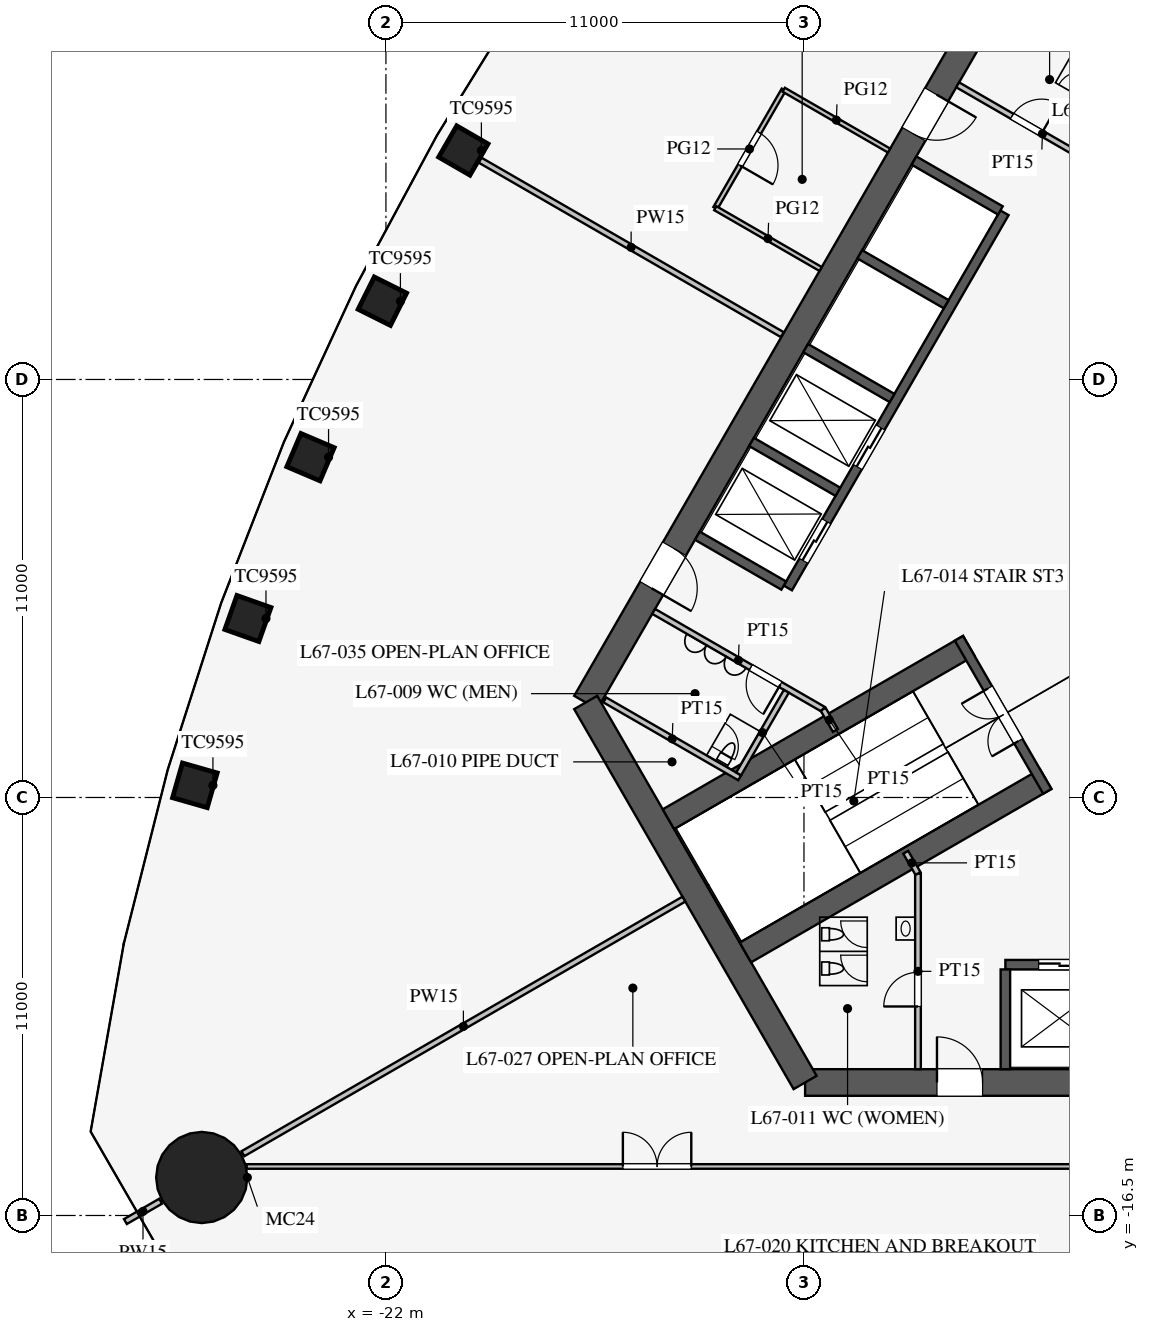
"""IFC4 building model, lengths in metres.
Left out: names, types, materials, properties, quantities, classifications, styles, units other than length and angle.
Written with IfcOpenShell. Run it as: python <this file> out.ifc"""

import sys

from ifc_helpers import new_model, si_unit, direction, frame, frame_2d, origin, origin_2d, place, context, subcontext, project, spatial, rectangle, circle, extrude, element, fill, save


model = new_model("IFC4")
c1 = context("Model", 3, precision=1e-05, world=origin(), true_north=direction((0.0, 1.0)))
c2 = subcontext(c1, "Body", "Model", "MODEL_VIEW")
j1 = project(units=[si_unit("LENGTHUNIT", "METRE"), si_unit("PLANEANGLEUNIT", "RADIAN")], contexts=[c1])
p1 = place(None, origin())
s1 = spatial("IfcSite", under=j1, at=p1, CompositionType="ELEMENT")
p2 = place(p1, origin())
s2 = spatial("IfcBuilding", under=s1, at=p2, CompositionType="ELEMENT")
p3 = place(p2, frame((0.0, 0.0, 293.1)))
s3 = spatial("IfcBuildingStorey", under=s2, at=p3, CompositionType="ELEMENT", Elevation=293.1)
for number, where, z_axis, x_axis in (
    (1, (-19.963, 11.526, 0.0), (0.0, 0.0, 1.0), (-0.5, -0.866, 0.0)),
    (2, (-22.094, 7.56, 0.0), (0.0, 0.0, 1.0), (-0.447, -0.895, 0.0)),
    (3, (-23.985, 3.455, 0.0), (0.0, 0.0, 1.0), (-0.391, -0.92, 0.0)),
    (4, (-25.632, -0.79, 0.0), (0.0, 0.0, 1.0), (-0.334, -0.942, 0.0)),
    (5, (-27.027, -5.18, 0.0), (0.0, 0.0, 1.0), (-0.275, -0.961, 0.0)),
):
    element("IfcColumn", number, at=place(p3, frame(where, z_axis=z_axis, x_axis=x_axis)), inside=s3, PredefinedType="COLUMN", context=c2, shape_type="SweptSolid", body=[
        extrude(rectangle(XDim=0.95, YDim=0.95, at=origin_2d()), origin(), (0.0, 0.0, 1.0), 4.2),
    ])
p4 = place(p3, frame((-26.847, -15.5, 0.0), z_axis=(0.0, 0.0, 1.0), x_axis=(1.0, 0.0, 0.0)))
e6 = element("IfcColumn", 6, at=p4, inside=s3, PredefinedType="COLUMN", context=c2, shape_type="SweptSolid", body=[
    extrude(circle(Radius=1.2, at=origin_2d()), origin(), (0.0, 0.0, 1.0), 4.2),
])
p5 = place(p3, frame((-10.97, -13.0, 0.0), z_axis=(0.0, 0.0, 1.0), x_axis=(1.0, 0.0, 0.0)))
e7 = element("IfcWall", 7, at=p5, inside=s3, PredefinedType="SHEAR", context=c2, shape_type="SweptSolid", body=[
    extrude(rectangle(XDim=21.939, YDim=0.7, at=frame_2d((10.97, 0.0))), origin(), (0.0, 0.0, 1.0), 4.2),
])
p6 = place(p5, frame((17.27, 0.0, 0.0)))
e8 = element("IfcOpeningElement", 8, at=p6, cuts=e7, PredefinedType="OPENING", context=c2, shape_type="SweptSolid", body=[
    extrude(rectangle(XDim=1.2, YDim=2.1, at=frame_2d((0.6, 1.05))), frame((0.0, 0.36, 0.0), z_axis=(0.0, -1.0, 0.0), x_axis=(1.0, 0.0, 0.0)), (0.0, 0.0, 1.0), 0.72),
])
p7 = place(p5, frame((3.47, 0.0, 0.0)))
e9 = element("IfcOpeningElement", 9, at=p7, cuts=e7, PredefinedType="OPENING", context=c2, shape_type="SweptSolid", body=[
    extrude(rectangle(XDim=1.2, YDim=2.1, at=frame_2d((0.6, 1.05))), frame((0.0, 0.36, 0.0), z_axis=(0.0, -1.0, 0.0), x_axis=(1.0, 0.0, 0.0)), (0.0, 0.0, 1.0), 0.72),
])
p8 = place(p3, frame((-5.773, 16.0, 0.0), z_axis=(0.0, 0.0, 1.0), x_axis=(-0.500002442456, -0.866023993627, 0.0)))
e10 = element("IfcWall", 10, at=p8, inside=s3, PredefinedType="SHEAR", context=c2, shape_type="SweptSolid", body=[
    extrude(rectangle(XDim=21.939, YDim=0.7, at=frame_2d((10.97, 0.0))), origin(), (0.0, 0.0, 1.0), 4.2),
])
p9 = place(p8, frame((17.27, 0.0, 0.0)))
e11 = element("IfcOpeningElement", 11, at=p9, cuts=e10, PredefinedType="OPENING", context=c2, shape_type="SweptSolid", body=[
    extrude(rectangle(XDim=1.2, YDim=2.1, at=frame_2d((0.6, 1.05))), frame((0.0, 0.36, 0.0), z_axis=(0.0, -1.0, 0.0), x_axis=(1.0, 0.0, 0.0)), (0.0, 0.0, 1.0), 0.72),
])
p10 = place(p8, frame((3.47, 0.0, 0.0)))
e12 = element("IfcOpeningElement", 12, at=p10, cuts=e10, PredefinedType="OPENING", context=c2, shape_type="SweptSolid", body=[
    extrude(rectangle(XDim=1.2, YDim=2.1, at=frame_2d((0.6, 1.05))), frame((0.0, 0.36, 0.0), z_axis=(0.0, -1.0, 0.0), x_axis=(1.0, 0.0, 0.0)), (0.0, 0.0, 1.0), 0.72),
])
p11 = place(p3, frame((-16.743, -3.0, 0.0), z_axis=(0.0, 0.0, 1.0), x_axis=(0.499995765644, -0.866027848477, 0.0)))
e13 = element("IfcWall", 13, at=p11, inside=s3, PredefinedType="SHEAR", context=c2, shape_type="SweptSolid", body=[
    extrude(rectangle(XDim=11.547, YDim=0.7, at=frame_2d((5.773, 0.0))), origin(), (0.0, 0.0, 1.0), 4.2),
])
p12 = place(p3, frame((-5.7, -9.9, 0.0), z_axis=(0.0, 0.0, 1.0), x_axis=(1.0, 0.0, 0.0)))
e14 = element("IfcWall", 14, at=p12, inside=s3, PredefinedType="SHEAR", context=c2, shape_type="SweptSolid", body=[
    extrude(rectangle(XDim=11.4, YDim=0.25, at=frame_2d((5.7, 0.0))), origin(), (0.0, 0.0, 1.0), 4.2),
])
p13 = place(p12, frame((0.875, 0.0, 0.0)))
e15 = element("IfcOpeningElement", 15, at=p13, cuts=e14, PredefinedType="OPENING", context=c2, shape_type="SweptSolid", body=[
    extrude(rectangle(XDim=1.1, YDim=2.2, at=frame_2d((0.55, 1.1))), frame((0.0, 0.135, 0.0), z_axis=(0.0, -1.0, 0.0), x_axis=(1.0, 0.0, 0.0)), (0.0, 0.0, 1.0), 0.27),
])
p14 = place(p12, frame((3.725, 0.0, 0.0)))
e16 = element("IfcOpeningElement", 16, at=p14, cuts=e14, PredefinedType="OPENING", context=c2, shape_type="SweptSolid", body=[
    extrude(rectangle(XDim=1.1, YDim=2.2, at=frame_2d((0.55, 1.1))), frame((0.0, 0.135, 0.0), z_axis=(0.0, -1.0, 0.0), x_axis=(1.0, 0.0, 0.0)), (0.0, 0.0, 1.0), 0.27),
])
p15 = place(p12, frame((6.575, 0.0, 0.0)))
e17 = element("IfcOpeningElement", 17, at=p15, cuts=e14, PredefinedType="OPENING", context=c2, shape_type="SweptSolid", body=[
    extrude(rectangle(XDim=1.1, YDim=2.2, at=frame_2d((0.55, 1.1))), frame((0.0, 0.135, 0.0), z_axis=(0.0, -1.0, 0.0), x_axis=(1.0, 0.0, 0.0)), (0.0, 0.0, 1.0), 0.27),
])
p16 = place(p12, frame((9.425, 0.0, 0.0)))
e18 = element("IfcOpeningElement", 18, at=p16, cuts=e14, PredefinedType="OPENING", context=c2, shape_type="SweptSolid", body=[
    extrude(rectangle(XDim=1.1, YDim=2.2, at=frame_2d((0.55, 1.1))), frame((0.0, 0.135, 0.0), z_axis=(0.0, -1.0, 0.0), x_axis=(1.0, 0.0, 0.0)), (0.0, 0.0, 1.0), 0.27),
])
p17 = place(p3, frame((-5.7, -10.025, 0.0), z_axis=(0.0, 0.0, 1.0), x_axis=(0.0, -1.0, 0.0)))
e19 = element("IfcWall", 19, at=p17, inside=s3, PredefinedType="SHEAR", context=c2, shape_type="SweptSolid", body=[
    extrude(rectangle(XDim=2.625, YDim=0.25, at=frame_2d((1.312, 0.0))), origin(), (0.0, 0.0, 1.0), 4.2),
])
p18 = place(p3, frame((-5.724, 9.886, 0.0), z_axis=(0.0, 0.0, 1.0), x_axis=(-0.500001763848, -0.866024385424, 0.0)))
e20 = element("IfcWall", 20, at=p18, inside=s3, PredefinedType="SHEAR", context=c2, shape_type="SweptSolid", body=[
    extrude(rectangle(XDim=11.4, YDim=0.25, at=frame_2d((5.7, 0.0))), origin(), (0.0, 0.0, 1.0), 4.2),
])
p19 = place(p18, frame((6.525, 0.0, 0.0)))
e21 = element("IfcOpeningElement", 21, at=p19, cuts=e20, PredefinedType="OPENING", context=c2, shape_type="SweptSolid", body=[
    extrude(rectangle(XDim=1.2, YDim=2.2, at=frame_2d((0.6, 1.1))), frame((0.0, 0.135, 0.0), z_axis=(0.0, -1.0, 0.0), x_axis=(1.0, 0.0, 0.0)), (0.0, 0.0, 1.0), 0.27),
])
p20 = place(p18, frame((9.375, 0.0, 0.0)))
e22 = element("IfcOpeningElement", 22, at=p20, cuts=e20, PredefinedType="OPENING", context=c2, shape_type="SweptSolid", body=[
    extrude(rectangle(XDim=1.2, YDim=2.2, at=frame_2d((0.6, 1.1))), frame((0.0, 0.135, 0.0), z_axis=(0.0, -1.0, 0.0), x_axis=(1.0, 0.0, 0.0)), (0.0, 0.0, 1.0), 0.27),
])
for number, where, z_axis, x_axis in (
    (23, (-5.832, 9.949, 0.0), (0.0, 0.0, 1.0), (-0.866, 0.5, 0.0)),
    (24, (-7.257, 7.481, 0.0), (0.0, 0.0, 1.0), (-0.866, 0.5, 0.0)),
    (25, (-8.682, 5.012, 0.0), (0.0, 0.0, 1.0), (-0.866, 0.5, 0.0)),
    (26, (-10.107, 2.544, 0.0), (0.0, 0.0, 1.0), (-0.866, 0.5, 0.0)),
    (27, (-11.532, 0.076, 0.0), (0.0, 0.0, 1.0), (-0.866, 0.5, 0.0)),
):
    element("IfcWall", number, at=place(p3, frame(where, z_axis=z_axis, x_axis=x_axis)), inside=s3, PredefinedType="SHEAR", context=c2, shape_type="SweptSolid", body=[
        extrude(rectangle(XDim=2.625, YDim=0.25, at=frame_2d((1.312, 0.0))), origin(), (0.0, 0.0, 1.0), 4.2),
    ])
for number, where, z_axis, x_axis in (
    (28, (-6.663, -1.509, 0.0), (0.0, 0.0, 1.0), (-0.866, -0.5, 0.0)),
    (29, (-4.638, -5.016, 0.0), (0.0, 0.0, 1.0), (-0.866, -0.5, 0.0)),
):
    element("IfcWall", number, at=place(p3, frame(where, z_axis=z_axis, x_axis=x_axis)), inside=s3, PredefinedType="SHEAR", context=c2, shape_type="SweptSolid", body=[
        extrude(rectangle(XDim=9.125, YDim=0.6, at=frame_2d((4.562, 0.0))), origin(), (0.0, 0.0, 1.0), 4.2),
    ])
p21 = place(p3, frame((-6.922, -1.312, 0.0), z_axis=(0.0, 0.0, 1.0), x_axis=(0.499984536904, -0.866034331223, 0.0)))
e30 = element("IfcWall", 30, at=p21, inside=s3, PredefinedType="SHEAR", context=c2, shape_type="SweptSolid", body=[
    extrude(rectangle(XDim=4.65, YDim=0.25, at=frame_2d((2.325, 0.0))), origin(), (0.0, 0.0, 1.0), 4.2),
])
p22 = place(p21, frame((1.525, 0.0, 0.0)))
e31 = element("IfcOpeningElement", 31, at=p22, cuts=e30, PredefinedType="OPENING", context=c2, shape_type="SweptSolid", body=[
    extrude(rectangle(XDim=1.6, YDim=2.1, at=frame_2d((0.8, 1.05))), frame((0.0, 0.135, 0.0), z_axis=(0.0, -1.0, 0.0), x_axis=(1.0, 0.0, 0.0)), (0.0, 0.0, 1.0), 0.27),
])
p23 = place(p3, frame((-8.0, -7.5, 0.0), z_axis=(0.0, 0.0, 1.0), x_axis=(0.0, -1.0, 0.0)))
e32 = element("IfcWall", 32, at=p23, inside=s3, PredefinedType="PARTITIONING", context=c2, shape_type="SweptSolid", body=[
    extrude(rectangle(XDim=5.15, YDim=0.15, at=frame_2d((2.575, 0.0))), origin(), (0.0, 0.0, 1.0), 4.0),
])
p24 = place(p23, frame((2.6, 0.0, 0.0)))
e33 = element("IfcOpeningElement", 33, at=p24, cuts=e32, PredefinedType="OPENING", context=c2, shape_type="SweptSolid", body=[
    extrude(rectangle(XDim=0.9, YDim=2.1, at=frame_2d((0.45, 1.05))), frame((0.0, 0.085, 0.0), z_axis=(0.0, -1.0, 0.0), x_axis=(1.0, 0.0, 0.0)), (0.0, 0.0, 1.0), 0.17),
])
p25 = place(p3, frame((-10.495, -3.178, 0.0), z_axis=(0.0, 0.0, 1.0), x_axis=(-0.866037967349, 0.499978238636, 0.0)))
e34 = element("IfcWall", 34, at=p25, inside=s3, PredefinedType="PARTITIONING", context=c2, shape_type="SweptSolid", body=[
    extrude(rectangle(XDim=5.15, YDim=0.15, at=frame_2d((2.575, 0.0))), origin(), (0.0, 0.0, 1.0), 4.0),
])
p26 = place(p25, frame((1.3, 0.0, 0.0)))
e35 = element("IfcOpeningElement", 35, at=p26, cuts=e34, PredefinedType="OPENING", context=c2, shape_type="SweptSolid", body=[
    extrude(rectangle(XDim=0.9, YDim=2.1, at=frame_2d((0.45, 1.05))), frame((0.0, 0.085, 0.0), z_axis=(0.0, -1.0, 0.0), x_axis=(1.0, 0.0, 0.0)), (0.0, 0.0, 1.0), 0.17),
])
p27 = place(p3, frame((-2.495, 10.678, 0.0), z_axis=(0.0, 0.0, 1.0), x_axis=(-0.866037967349, 0.499978238636, 0.0)))
e36 = element("IfcWall", 36, at=p27, inside=s3, PredefinedType="PARTITIONING", context=c2, shape_type="SweptSolid", body=[
    extrude(rectangle(XDim=5.15, YDim=0.15, at=frame_2d((2.575, 0.0))), origin(), (0.0, 0.0, 1.0), 4.0),
])
p28 = place(p27, frame((2.6, 0.0, 0.0)))
e37 = element("IfcOpeningElement", 37, at=p28, cuts=e36, PredefinedType="OPENING", context=c2, shape_type="SweptSolid", body=[
    extrude(rectangle(XDim=0.9, YDim=2.1, at=frame_2d((0.45, 1.05))), frame((0.0, 0.085, 0.0), z_axis=(0.0, -1.0, 0.0), x_axis=(1.0, 0.0, 0.0)), (0.0, 0.0, 1.0), 0.17),
])
for number, where, z_axis, x_axis in (
    (38, (-10.495, -3.178, 0.0), (0.0, 0.0, 1.0), (0.5, -0.866, 0.0)),
    (39, (-8.0, -7.5, 0.0), (0.0, 0.0, 1.0), (-0.5, 0.866, 0.0)),
):
    element("IfcWall", number, at=place(p3, frame(where, z_axis=z_axis, x_axis=x_axis)), inside=s3, PredefinedType="PARTITIONING", context=c2, shape_type="SweptSolid", body=[
        extrude(rectangle(XDim=0.645, YDim=0.15, at=frame_2d((0.323, 0.0))), origin(), (0.0, 0.0, 1.0), 4.0),
    ])
p29 = place(p3, frame((-2.031, 13.482, 0.0), z_axis=(0.0, 0.0, 1.0), x_axis=(-0.866050731258, 0.499956128963, 0.0)))
e40 = element("IfcWall", 40, at=p29, inside=s3, PredefinedType="PARTITIONING", context=c2, shape_type="SweptSolid", body=[
    extrude(rectangle(XDim=4.1, YDim=0.15, at=frame_2d((2.05, 0.0))), origin(), (0.0, 0.0, 1.0), 4.0),
])
p30 = place(p3, frame((-12.691, -4.982, 0.0), z_axis=(0.0, 0.0, 1.0), x_axis=(-0.8660249478, 0.500000789788, 0.0)))
e41 = element("IfcWall", 41, at=p30, inside=s3, PredefinedType="PARTITIONING", context=c2, shape_type="SweptSolid", body=[
    extrude(rectangle(XDim=4.1, YDim=0.15, at=frame_2d((2.05, 0.0))), origin(), (0.0, 0.0, 1.0), 4.0),
])
p31 = place(p3, frame((-11.464, -2.706, 0.0), z_axis=(0.0, 0.0, 1.0), x_axis=(-0.50001992892, -0.866013897511, 0.0)))
e42 = element("IfcWall", 42, at=p31, inside=s3, PredefinedType="PARTITIONING", context=c2, shape_type="SweptSolid", body=[
    extrude(rectangle(XDim=2.51, YDim=0.15, at=frame_2d((1.255, 0.0))), origin(), (0.0, 0.0, 1.0), 4.0),
])
p32 = place(p3, frame((-14.159, -8.175, 0.0), z_axis=(0.0, 0.0, 1.0), x_axis=(-0.866026905467, -0.499997399001, 0.0)))
e43 = element("IfcWall", 43, at=p32, inside=s3, PredefinedType="PARTITIONING", context=c2, shape_type="SweptSolid", body=[
    extrude(rectangle(XDim=13.4, YDim=0.15, at=frame_2d((6.7, 0.0))), origin(), (0.0, 0.0, 1.0), 2.5),
])
p33 = place(p3, frame((-27.929, -16.125, 0.0), z_axis=(0.0, 0.0, 1.0), x_axis=(-0.866086810508, -0.499893625349, 0.0)))
e44 = element("IfcWall", 44, at=p33, inside=s3, PredefinedType="PARTITIONING", context=c2, shape_type="SweptSolid", body=[
    extrude(rectangle(XDim=1.07, YDim=0.15, at=frame_2d((0.535, 0.0))), origin(), (0.0, 0.0, 1.0), 2.5),
])
p34 = place(p3, frame((-25.665, -15.21, 0.0), z_axis=(0.0, 0.0, 1.0), x_axis=(1.0, 0.0, 0.0)))
e45 = element("IfcWall", 45, at=p34, inside=s3, PredefinedType="PARTITIONING", context=c2, shape_type="SweptSolid", body=[
    extrude(rectangle(XDim=51.33, YDim=0.12, at=frame_2d((25.665, 0.0))), origin(), (0.0, 0.0, 1.0), 2.9),
])
p35 = place(p34, frame((9.9, 0.0, 0.15)))
e46 = element("IfcOpeningElement", 46, at=p35, cuts=e45, PredefinedType="OPENING", context=c2, shape_type="SweptSolid", body=[
    extrude(rectangle(XDim=1.8, YDim=2.1, at=frame_2d((0.9, 1.05))), frame((0.0, 0.07, 0.0), z_axis=(0.0, -1.0, 0.0), x_axis=(1.0, 0.0, 0.0)), (0.0, 0.0, 1.0), 0.14),
])
p36 = place(p34, frame((39.6, 0.0, 0.15)))
e47 = element("IfcOpeningElement", 47, at=p36, cuts=e45, PredefinedType="OPENING", context=c2, shape_type="SweptSolid", body=[
    extrude(rectangle(XDim=1.8, YDim=2.1, at=frame_2d((0.9, 1.05))), frame((0.0, 0.07, 0.0), z_axis=(0.0, -1.0, 0.0), x_axis=(1.0, 0.0, 0.0)), (0.0, 0.0, 1.0), 0.14),
])
p37 = place(p3, frame((-11.57, 6.68, 0.0), z_axis=(0.0, 0.0, 1.0), x_axis=(-0.866026706704, 0.49999774327, 0.0)))
e48 = element("IfcWall", 48, at=p37, inside=s3, PredefinedType="PARTITIONING", context=c2, shape_type="SweptSolid", body=[
    extrude(rectangle(XDim=9.187, YDim=0.15, at=frame_2d((4.593, 0.0))), origin(), (0.0, 0.0, 1.0), 3.3),
])
p38 = place(p3, frame((-11.533, 13.125, 0.0), z_axis=(0.0, 0.0, 1.0), x_axis=(-0.500012057535, -0.866018442252, 0.0)))
e49 = element("IfcWall", 49, at=p38, inside=s3, PredefinedType="PARTITIONING", context=c2, shape_type="SweptSolid", body=[
    extrude(rectangle(XDim=3.6, YDim=0.12, at=frame_2d((1.8, 0.0))), origin(), (0.0, 0.0, 1.0), 2.9),
])
p39 = place(p38, frame((1.3, 0.0, 0.15)))
e50 = element("IfcOpeningElement", 50, at=p39, cuts=e49, PredefinedType="OPENING", context=c2, shape_type="SweptSolid", body=[
    extrude(rectangle(XDim=1.0, YDim=2.1, at=frame_2d((0.5, 1.05))), frame((0.0, 0.07, 0.0), z_axis=(0.0, -1.0, 0.0), x_axis=(1.0, 0.0, 0.0)), (0.0, 0.0, 1.0), 0.14),
])
for number, where, z_axis, x_axis in (
    (51, (-10.562, 8.407, 0.0), (0.0, 0.0, 1.0), (-0.866, 0.5, 0.0)),
    (52, (-8.761, 11.525, 0.0), (0.0, 0.0, 1.0), (-0.866, 0.5, 0.0)),
):
    element("IfcWall", number, at=place(p3, frame(where, z_axis=z_axis, x_axis=x_axis)), inside=s3, PredefinedType="PARTITIONING", context=c2, shape_type="SweptSolid", body=[
        extrude(rectangle(XDim=3.2, YDim=0.12, at=frame_2d((1.6, 0.0))), origin(), (0.0, 0.0, 1.0), 2.9),
    ])
p40 = place(p24, frame((0.9, 0.0, 0.0), z_axis=(0.0, 0.0, 1.0), x_axis=(-1.0, 0.0, 0.0)))
e53 = element("IfcDoor", 53, at=p40, inside=s3, OperationType="SINGLE_SWING_LEFT", PredefinedType="DOOR", context=c2, shape_type="SweptSolid", body=[
    extrude(rectangle(XDim=0.9, YDim=2.1, at=frame_2d((0.45, 1.05))), frame((0.0, 0.025, 0.0), z_axis=(0.0, -1.0, 0.0), x_axis=(1.0, 0.0, 0.0)), (0.0, 0.0, 1.0), 0.05),
])
fill(e33, e53)
p41 = place(p26, origin())
e54 = element("IfcDoor", 54, at=p41, inside=s3, OperationType="SINGLE_SWING_LEFT", PredefinedType="DOOR", context=c2, shape_type="SweptSolid", body=[
    extrude(rectangle(XDim=0.9, YDim=2.1, at=frame_2d((0.45, 1.05))), frame((0.0, 0.025, 0.0), z_axis=(0.0, -1.0, 0.0), x_axis=(1.0, 0.0, 0.0)), (0.0, 0.0, 1.0), 0.05),
])
fill(e35, e54)
p42 = place(p28, frame((0.9, 0.0, 0.0), z_axis=(0.0, 0.0, 1.0), x_axis=(-1.0, 0.0, 0.0)))
e55 = element("IfcDoor", 55, at=p42, inside=s3, OperationType="SINGLE_SWING_RIGHT", PredefinedType="DOOR", context=c2, shape_type="SweptSolid", body=[
    extrude(rectangle(XDim=0.9, YDim=2.1, at=frame_2d((0.45, 1.05))), frame((0.0, 0.025, 0.0), z_axis=(0.0, -1.0, 0.0), x_axis=(1.0, 0.0, 0.0)), (0.0, 0.0, 1.0), 0.05),
])
fill(e37, e55)
p43 = place(p22, frame((1.6, 0.0, 0.0), z_axis=(0.0, 0.0, 1.0), x_axis=(-1.0, 0.0, 0.0)))
e56 = element("IfcDoor", 56, at=p43, inside=s3, OperationType="DOUBLE_DOOR_SINGLE_SWING", PredefinedType="DOOR", context=c2, shape_type="SweptSolid", body=[
    extrude(rectangle(XDim=1.6, YDim=2.1, at=frame_2d((0.8, 1.05))), frame((0.0, 0.025, 0.0), z_axis=(0.0, -1.0, 0.0), x_axis=(1.0, 0.0, 0.0)), (0.0, 0.0, 1.0), 0.05),
])
fill(e31, e56)
p44 = place(p7, origin())
e57 = element("IfcDoor", 57, at=p44, inside=s3, OperationType="SINGLE_SWING_LEFT", PredefinedType="DOOR", context=c2, shape_type="SweptSolid", body=[
    extrude(rectangle(XDim=1.2, YDim=2.1, at=frame_2d((0.6, 1.05))), frame((0.0, 0.025, 0.0), z_axis=(0.0, -1.0, 0.0), x_axis=(1.0, 0.0, 0.0)), (0.0, 0.0, 1.0), 0.05),
])
fill(e9, e57)
p45 = place(p9, origin())
e58 = element("IfcDoor", 58, at=p45, inside=s3, OperationType="SINGLE_SWING_RIGHT", PredefinedType="DOOR", context=c2, shape_type="SweptSolid", body=[
    extrude(rectangle(XDim=1.2, YDim=2.1, at=frame_2d((0.6, 1.05))), frame((0.0, 0.025, 0.0), z_axis=(0.0, -1.0, 0.0), x_axis=(1.0, 0.0, 0.0)), (0.0, 0.0, 1.0), 0.05),
])
fill(e11, e58)
p46 = place(p10, origin())
e59 = element("IfcDoor", 59, at=p46, inside=s3, OperationType="SINGLE_SWING_LEFT", PredefinedType="DOOR", context=c2, shape_type="SweptSolid", body=[
    extrude(rectangle(XDim=1.2, YDim=2.1, at=frame_2d((0.6, 1.05))), frame((0.0, 0.025, 0.0), z_axis=(0.0, -1.0, 0.0), x_axis=(1.0, 0.0, 0.0)), (0.0, 0.0, 1.0), 0.05),
])
fill(e12, e59)
p47 = place(p35, origin())
e60 = element("IfcDoor", 60, at=p47, inside=s3, OperationType="DOUBLE_DOOR_SINGLE_SWING", PredefinedType="DOOR", context=c2, shape_type="SweptSolid", body=[
    extrude(rectangle(XDim=1.8, YDim=2.1, at=frame_2d((0.9, 1.05))), frame((0.0, 0.025, 0.0), z_axis=(0.0, -1.0, 0.0), x_axis=(1.0, 0.0, 0.0)), (0.0, 0.0, 1.0), 0.05),
])
fill(e46, e60)
p48 = place(p39, origin())
e61 = element("IfcDoor", 61, at=p48, inside=s3, OperationType="SINGLE_SWING_RIGHT", PredefinedType="DOOR", context=c2, shape_type="SweptSolid", body=[
    extrude(rectangle(XDim=1.0, YDim=2.1, at=frame_2d((0.5, 1.05))), frame((0.0, 0.025, 0.0), z_axis=(0.0, -1.0, 0.0), x_axis=(1.0, 0.0, 0.0)), (0.0, 0.0, 1.0), 0.05),
])
fill(e50, e61)
p49 = place(p13, origin())
e62 = element("IfcDoor", 62, at=p49, inside=s3, OperationType="DOUBLE_DOOR_SLIDING", PredefinedType="DOOR", context=c2, shape_type="SweptSolid", body=[
    extrude(rectangle(XDim=1.1, YDim=2.2, at=frame_2d((0.55, 1.1))), frame((0.0, 0.025, 0.0), z_axis=(0.0, -1.0, 0.0), x_axis=(1.0, 0.0, 0.0)), (0.0, 0.0, 1.0), 0.05),
])
fill(e15, e62)
p50 = place(p19, origin())
e63 = element("IfcDoor", 63, at=p50, inside=s3, OperationType="DOUBLE_DOOR_SLIDING", PredefinedType="DOOR", context=c2, shape_type="SweptSolid", body=[
    extrude(rectangle(XDim=1.2, YDim=2.2, at=frame_2d((0.6, 1.1))), frame((0.0, 0.025, 0.0), z_axis=(0.0, -1.0, 0.0), x_axis=(1.0, 0.0, 0.0)), (0.0, 0.0, 1.0), 0.05),
])
fill(e21, e63)
p51 = place(p20, origin())
e64 = element("IfcDoor", 64, at=p51, inside=s3, OperationType="DOUBLE_DOOR_SLIDING", PredefinedType="DOOR", context=c2, shape_type="SweptSolid", body=[
    extrude(rectangle(XDim=1.2, YDim=2.2, at=frame_2d((0.6, 1.1))), frame((0.0, 0.025, 0.0), z_axis=(0.0, -1.0, 0.0), x_axis=(1.0, 0.0, 0.0)), (0.0, 0.0, 1.0), 0.05),
])
fill(e22, e64)
save(model, sys.argv[1])
